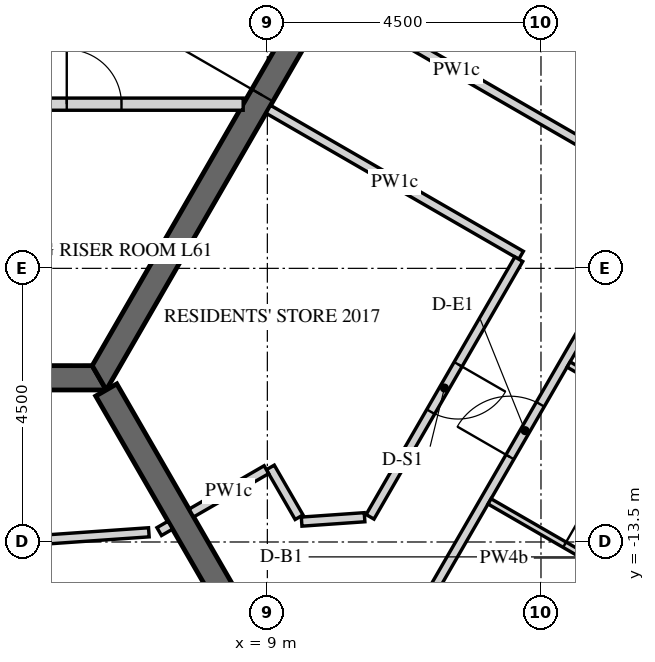
"""IFC4 building model, lengths in metres.
Left out: names, types, materials, properties, quantities, classifications, styles, units other than length and angle.
Written with IfcOpenShell. Run it as: python <this file> out.ifc"""

import sys

from ifc_helpers import new_model, si_unit, direction, frame, frame_2d, origin, place, context, subcontext, project, spatial, polyline, rectangle, outline, extrude, element, fill, save


model = new_model("IFC4")
c1 = context("Model", 3, precision=1e-05, world=origin(), true_north=direction((0.0, 1.0)))
c2 = subcontext(c1, "Body", "Model", "MODEL_VIEW")
j1 = project(units=[si_unit("LENGTHUNIT", "METRE"), si_unit("PLANEANGLEUNIT", "RADIAN")], contexts=[c1])
p1 = place(None, origin())
s1 = spatial("IfcSite", under=j1, at=p1, CompositionType="ELEMENT")
p2 = place(p1, origin())
s2 = spatial("IfcBuilding", under=s1, at=p2, CompositionType="ELEMENT")
p3 = place(p2, frame((0.0, 0.0, 256.2)))
s3 = spatial("IfcBuildingStorey", under=s2, at=p3, CompositionType="ELEMENT", Elevation=256.2)
p4 = place(p3, frame((-6.235, -10.8, 0.0), z_axis=(0.0, 0.0, 1.0), x_axis=(1.0, 0.0, 0.0)))
e1 = element("IfcWall", 1, at=p4, inside=s3, PredefinedType="SHEAR", context=c2, shape_type="SweptSolid", body=[
    extrude(outline(polyline([(-0.115, -0.2), (12.586, -0.2), (12.355, 0.2), (0.115, 0.2), (-0.115, -0.2)])), origin(), (0.0, 0.0, 1.0), 3.75),
])
p5 = place(p3, frame((6.235, -10.8, 0.0), z_axis=(0.0, 0.0, 1.0), x_axis=(0.499996419489, 0.866027470984, 0.0)))
e2 = element("IfcWall", 2, at=p5, inside=s3, PredefinedType="SHEAR", context=c2, shape_type="SweptSolid", body=[
    extrude(outline(polyline([(-0.115, -0.2), (12.586, -0.2), (12.355, 0.2), (0.115, 0.2), (-0.115, -0.2)])), origin(), (0.0, 0.0, 1.0), 3.75),
])
p6 = place(p5, frame((5.364, 0.0, 0.0)))
e3 = element("IfcOpeningElement", 3, at=p6, cuts=e2, PredefinedType="OPENING", context=c2, shape_type="SweptSolid", body=[
    extrude(rectangle(XDim=1.8, YDim=2.4, at=frame_2d((0.9, 1.2))), frame((0.0, 0.21, 0.0), z_axis=(0.0, -1.0, 0.0), x_axis=(1.0, 0.0, 0.0)), (0.0, 0.0, 1.0), 0.42),
])
p7 = place(p3, frame((6.351, -11.0, 0.0), z_axis=(0.0, 0.0, 1.0), x_axis=(0.499998894578, -0.866026041999, 0.0)))
e4 = element("IfcWall", 4, at=p7, inside=s3, PredefinedType="SHEAR", context=c2, shape_type="SweptSolid", body=[
    extrude(rectangle(XDim=15.544, YDim=0.4, at=frame_2d((7.772, 0.0))), origin(), (0.0, 0.0, 1.0), 3.75),
])
p8 = place(p7, frame((6.872, 0.0, 0.0)))
e5 = element("IfcOpeningElement", 5, at=p8, cuts=e4, PredefinedType="OPENING", context=c2, shape_type="SweptSolid", body=[
    extrude(rectangle(XDim=1.8, YDim=2.4, at=frame_2d((0.9, 1.2))), frame((0.0, 0.21, 0.0), z_axis=(0.0, -1.0, 0.0), x_axis=(1.0, 0.0, 0.0)), (0.0, 0.0, 1.0), 0.42),
])
p9 = place(p3, frame((3.7, -6.3, 0.0), z_axis=(0.0, 0.0, 1.0), x_axis=(1.0, 0.0, 0.0)))
e6 = element("IfcWall", 6, at=p9, inside=s3, PredefinedType="PARTITIONING", context=c2, shape_type="SweptSolid", body=[
    extrude(rectangle(XDim=4.903, YDim=0.2, at=frame_2d((2.451, 0.0))), origin(), (0.0, 0.0, 1.0), 3.65),
])
p10 = place(p9, frame((2.001, 0.0, 0.0)))
e7 = element("IfcOpeningElement", 7, at=p10, cuts=e6, PredefinedType="OPENING", context=c2, shape_type="SweptSolid", body=[
    extrude(rectangle(XDim=0.9, YDim=2.1, at=frame_2d((0.45, 1.05))), frame((0.0, 0.11, 0.0), z_axis=(0.0, -1.0, 0.0), x_axis=(1.0, 0.0, 0.0)), (0.0, 0.0, 1.0), 0.22),
])
p11 = place(p3, frame((7.404, -13.224, 0.0), z_axis=(0.0, 0.0, 1.0), x_axis=(-0.866088799389, -0.499890179513, 0.0)))
e8 = element("IfcWall", 8, at=p11, inside=s3, PredefinedType="PARTITIONING", context=c2, shape_type="SweptSolid", body=[
    extrude(rectangle(XDim=0.21, YDim=0.15, at=frame_2d((0.105, 0.0))), origin(), (0.0, 0.0, 1.0), 2.823),
])
p12 = place(p3, frame((7.051, -13.341, 0.0), z_axis=(0.0, 0.0, 1.0), x_axis=(-0.997563599815, -0.069762915103, 0.0)))
e9 = element("IfcWall", 9, at=p12, inside=s3, PredefinedType="PARTITIONING", context=c2, shape_type="SweptSolid", body=[
    extrude(rectangle(XDim=16.952, YDim=0.15, at=frame_2d((8.476, 0.0))), origin(), (0.0, 0.0, 1.0), 2.823),
])
p13 = place(p12, frame((8.026, 0.0, 0.0)))
e10 = element("IfcOpeningElement", 10, at=p13, cuts=e9, PredefinedType="OPENING", context=c2, shape_type="SweptSolid", body=[
    extrude(rectangle(XDim=0.9, YDim=2.1, at=frame_2d((0.45, 1.05))), frame((0.0, 0.085, 0.0), z_axis=(0.0, -1.0, 0.0), x_axis=(1.0, 0.0, 0.0)), (0.0, 0.0, 1.0), 0.17),
])
p14 = place(p3, frame((11.627, -14.462, 0.0), z_axis=(0.0, 0.0, 1.0), x_axis=(0.499994634027, 0.866028501808, 0.0)))
e11 = element("IfcWall", 11, at=p14, inside=s3, PredefinedType="PARTITIONING", context=c2, shape_type="SweptSolid", body=[
    extrude(rectangle(XDim=15.296, YDim=0.15, at=frame_2d((7.648, 0.0))), origin(), (0.0, 0.0, 1.0), 2.823),
])
p15 = place(p14, frame((2.725, 0.0, 0.0)))
e12 = element("IfcOpeningElement", 12, at=p15, cuts=e11, PredefinedType="OPENING", context=c2, shape_type="SweptSolid", body=[
    extrude(rectangle(XDim=1.0, YDim=2.1, at=frame_2d((0.5, 1.05))), frame((0.0, 0.085, 0.0), z_axis=(0.0, -1.0, 0.0), x_axis=(1.0, 0.0, 0.0)), (0.0, 0.0, 1.0), 0.17),
])
p16 = place(p14, frame((13.936, 0.0, 0.0)))
e13 = element("IfcOpeningElement", 13, at=p16, cuts=e11, PredefinedType="OPENING", context=c2, shape_type="SweptSolid", body=[
    extrude(rectangle(XDim=1.0, YDim=2.1, at=frame_2d((0.5, 1.05))), frame((0.0, 0.085, 0.0), z_axis=(0.0, -1.0, 0.0), x_axis=(1.0, 0.0, 0.0)), (0.0, 0.0, 1.0), 0.17),
])
p17 = place(p3, frame((14.158, -6.928, 0.0), z_axis=(0.0, 0.0, 1.0), x_axis=(-0.866024684746, 0.500001245408, 0.0)))
e14 = element("IfcWall", 14, at=p17, inside=s3, PredefinedType="PARTITIONING", context=c2, shape_type="SweptSolid", body=[
    extrude(rectangle(XDim=4.725, YDim=0.15, at=frame_2d((2.363, 0.0))), origin(), (0.0, 0.0, 1.0), 2.823),
])
p18 = place(p3, frame((9.016, -6.384, 0.0), z_axis=(0.0, 0.0, 1.0), x_axis=(0.866015339567, -0.500017431331, 0.0)))
e15 = element("IfcWall", 15, at=p18, inside=s3, PredefinedType="PARTITIONING", context=c2, shape_type="SweptSolid", body=[
    extrude(rectangle(XDim=4.8, YDim=0.15, at=frame_2d((2.4, 0.0))), origin(), (0.0, 0.0, 1.0), 2.823),
])
p19 = place(p3, frame((13.135, -8.849, 0.0), z_axis=(0.0, 0.0, 1.0), x_axis=(-0.500024829938, -0.866011067739, 0.0)))
e16 = element("IfcWall", 16, at=p19, inside=s3, PredefinedType="PARTITIONING", context=c2, shape_type="SweptSolid", body=[
    extrude(rectangle(XDim=4.892, YDim=0.15, at=frame_2d((2.446, 0.0))), origin(), (0.0, 0.0, 1.0), 2.823),
])
p20 = place(p19, frame((1.996, 0.0, 0.0)))
e17 = element("IfcOpeningElement", 17, at=p20, cuts=e16, PredefinedType="OPENING", context=c2, shape_type="SweptSolid", body=[
    extrude(rectangle(XDim=0.9, YDim=2.1, at=frame_2d((0.45, 1.05))), frame((0.0, 0.085, 0.0), z_axis=(0.0, -1.0, 0.0), x_axis=(1.0, 0.0, 0.0)), (0.0, 0.0, 1.0), 0.17),
])
p21 = place(p3, frame((10.599, -13.093, 0.0), z_axis=(0.0, 0.0, 1.0), x_axis=(-0.99755453913, -0.069892356245, 0.0)))
e18 = element("IfcWall", 18, at=p21, inside=s3, PredefinedType="PARTITIONING", context=c2, shape_type="SweptSolid", body=[
    extrude(rectangle(XDim=1.037, YDim=0.15, at=frame_2d((0.519, 0.0))), origin(), (0.0, 0.0, 1.0), 2.823),
])
p22 = place(p3, frame((9.522, -13.093, 0.0), z_axis=(0.0, 0.0, 1.0), x_axis=(-0.499804398801, 0.866138304741, 0.0)))
e19 = element("IfcWall", 19, at=p22, inside=s3, PredefinedType="PARTITIONING", context=c2, shape_type="SweptSolid", body=[
    extrude(rectangle(XDim=0.946, YDim=0.15, at=frame_2d((0.473, 0.0))), origin(), (0.0, 0.0, 1.0), 2.823),
])
p23 = place(p3, frame((8.984, -12.311, 0.0), z_axis=(0.0, 0.0, 1.0), x_axis=(-0.866020080793, -0.500009219579, 0.0)))
e20 = element("IfcWall", 20, at=p23, inside=s3, PredefinedType="PARTITIONING", context=c2, shape_type="SweptSolid", body=[
    extrude(rectangle(XDim=1.425, YDim=0.15, at=frame_2d((0.712, 0.0))), origin(), (0.0, 0.0, 1.0), 2.823),
])
p24 = place(p3, frame((12.654, -12.833, 0.0), z_axis=(0.0, 0.0, 1.0), x_axis=(0.866056803351, -0.499945610411, 0.0)))
e21 = element("IfcWall", 21, at=p24, inside=s3, PredefinedType="PARTITIONING", context=c2, shape_type="SweptSolid", body=[
    extrude(rectangle(XDim=3.725, YDim=0.1, at=frame_2d((1.863, 0.0))), origin(), (0.0, 0.0, 1.0), 2.823),
])
p25 = place(p24, frame((1.425, 0.0, 0.0)))
e22 = element("IfcOpeningElement", 22, at=p25, cuts=e21, PredefinedType="OPENING", context=c2, shape_type="SweptSolid", body=[
    extrude(rectangle(XDim=0.8, YDim=2.1, at=frame_2d((0.4, 1.05))), frame((0.0, 0.06, 0.0), z_axis=(0.0, -1.0, 0.0), x_axis=(1.0, 0.0, 0.0)), (0.0, 0.0, 1.0), 0.12),
])
p26 = place(p3, frame((17.137, -12.418, 0.0), z_axis=(0.0, 0.0, 1.0), x_axis=(-0.866035129944, 0.499983153418, 0.0)))
e23 = element("IfcWall", 23, at=p26, inside=s3, PredefinedType="PARTITIONING", context=c2, shape_type="SweptSolid", body=[
    extrude(rectangle(XDim=3.675, YDim=0.1, at=frame_2d((1.837, 0.0))), origin(), (0.0, 0.0, 1.0), 2.823),
])
p27 = place(p26, frame((1.45, 0.0, 0.0)))
e24 = element("IfcOpeningElement", 24, at=p27, cuts=e23, PredefinedType="OPENING", context=c2, shape_type="SweptSolid", body=[
    extrude(rectangle(XDim=0.8, YDim=2.1, at=frame_2d((0.4, 1.05))), frame((0.0, 0.06, 0.0), z_axis=(0.0, -1.0, 0.0), x_axis=(1.0, 0.0, 0.0)), (0.0, 0.0, 1.0), 0.12),
])
p28 = place(p6, origin())
e25 = element("IfcDoor", 25, at=p28, inside=s3, OperationType="DOUBLE_DOOR_SINGLE_SWING", PredefinedType="DOOR", context=c2, shape_type="SweptSolid", body=[
    extrude(rectangle(XDim=1.8, YDim=2.4, at=frame_2d((0.9, 1.2))), frame((0.0, 0.025, 0.0), z_axis=(0.0, -1.0, 0.0), x_axis=(1.0, 0.0, 0.0)), (0.0, 0.0, 1.0), 0.05),
])
fill(e3, e25)
p29 = place(p10, origin())
e26 = element("IfcDoor", 26, at=p29, inside=s3, OperationType="SINGLE_SWING_LEFT", PredefinedType="DOOR", context=c2, shape_type="SweptSolid", body=[
    extrude(rectangle(XDim=0.9, YDim=2.1, at=frame_2d((0.45, 1.05))), frame((0.0, 0.025, 0.0), z_axis=(0.0, -1.0, 0.0), x_axis=(1.0, 0.0, 0.0)), (0.0, 0.0, 1.0), 0.05),
])
fill(e7, e26)
p30 = place(p15, origin())
e27 = element("IfcDoor", 27, at=p30, inside=s3, OperationType="SINGLE_SWING_LEFT", PredefinedType="DOOR", context=c2, shape_type="SweptSolid", body=[
    extrude(rectangle(XDim=1.0, YDim=2.1, at=frame_2d((0.5, 1.05))), frame((0.0, 0.025, 0.0), z_axis=(0.0, -1.0, 0.0), x_axis=(1.0, 0.0, 0.0)), (0.0, 0.0, 1.0), 0.05),
])
fill(e12, e27)
p31 = place(p25, origin())
e28 = element("IfcDoor", 28, at=p31, inside=s3, OperationType="SINGLE_SWING_RIGHT", PredefinedType="DOOR", context=c2, shape_type="SweptSolid", body=[
    extrude(rectangle(XDim=0.8, YDim=2.1, at=frame_2d((0.4, 1.05))), frame((0.0, 0.025, 0.0), z_axis=(0.0, -1.0, 0.0), x_axis=(1.0, 0.0, 0.0)), (0.0, 0.0, 1.0), 0.05),
])
fill(e22, e28)
p32 = place(p20, origin())
e29 = element("IfcDoor", 29, at=p32, inside=s3, OperationType="SINGLE_SWING_LEFT", PredefinedType="DOOR", context=c2, shape_type="SweptSolid", body=[
    extrude(rectangle(XDim=0.9, YDim=2.1, at=frame_2d((0.45, 1.05))), frame((0.0, 0.025, 0.0), z_axis=(0.0, -1.0, 0.0), x_axis=(1.0, 0.0, 0.0)), (0.0, 0.0, 1.0), 0.05),
])
fill(e17, e29)
save(model, sys.argv[1])
